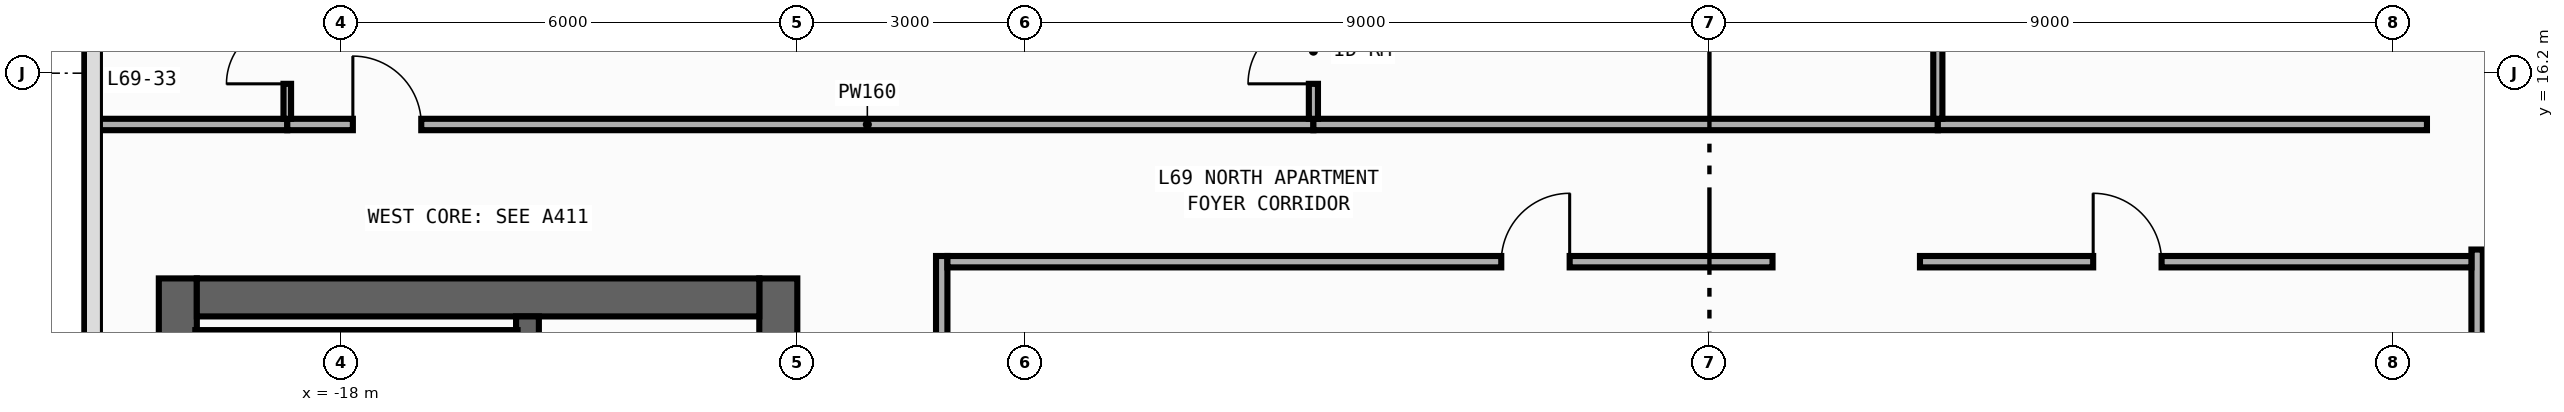
"""IFC4 building model, lengths in metres.
Left out: names, types, materials, properties, quantities, classifications, styles, units other than length and angle.
Written with IfcOpenShell. Run it as: python <this file> out.ifc"""

import sys

from ifc_helpers import new_model, si_unit, direction, frame, frame_2d, origin, place, context, subcontext, project, spatial, rectangle, extrude, element, fill, save


model = new_model("IFC4")
c1 = context("Model", 3, precision=1e-05, world=origin(), true_north=direction((0.0, 1.0)))
c2 = subcontext(c1, "Body", "Model", "MODEL_VIEW")
j1 = project(units=[si_unit("LENGTHUNIT", "METRE"), si_unit("PLANEANGLEUNIT", "RADIAN")], contexts=[c1])
p1 = place(None, origin())
s1 = spatial("IfcSite", under=j1, at=p1, CompositionType="ELEMENT")
p2 = place(p1, origin())
s2 = spatial("IfcBuilding", under=s1, at=p2, CompositionType="ELEMENT")
p3 = place(p2, frame((0.0, 0.0, 289.0)))
s3 = spatial("IfcBuildingStorey", under=s2, at=p3, CompositionType="ELEMENT", Elevation=289.0)
p4 = place(p3, frame((-20.15, -13.5, 0.0), z_axis=(0.0, 0.0, 1.0), x_axis=(0.0, 1.0, 0.0)))
e1 = element("IfcWall", 1, at=p4, inside=s3, PredefinedType="SHEAR", context=c2, shape_type="SweptSolid", body=[
    extrude(rectangle(XDim=27.0, YDim=0.5, at=frame_2d((13.5, 0.0))), origin(), (0.0, 0.0, 1.0), 3.54),
])
p5 = place(p3, frame((-12.25, -13.5, 0.0), z_axis=(0.0, 0.0, 1.0), x_axis=(0.0, 1.0, 0.0)))
e2 = element("IfcWall", 2, at=p5, inside=s3, PredefinedType="SHEAR", context=c2, shape_type="SweptSolid", body=[
    extrude(rectangle(XDim=27.0, YDim=0.5, at=frame_2d((13.5, 0.0))), origin(), (0.0, 0.0, 1.0), 3.54),
])
p6 = place(p5, frame((15.175, 0.0, 0.0)))
e3 = element("IfcOpeningElement", 3, at=p6, cuts=e2, PredefinedType="OPENING", context=c2, shape_type="SweptSolid", body=[
    extrude(rectangle(XDim=0.85, YDim=2.1, at=frame_2d((0.425, 1.05))), frame((0.0, 0.26, 0.0), z_axis=(0.0, -1.0, 0.0), x_axis=(1.0, 0.0, 0.0)), (0.0, 0.0, 1.0), 0.52),
])
p7 = place(p5, frame((21.275, 0.0, 0.0)))
e4 = element("IfcOpeningElement", 4, at=p7, cuts=e2, PredefinedType="OPENING", context=c2, shape_type="SweptSolid", body=[
    extrude(rectangle(XDim=0.85, YDim=2.1, at=frame_2d((0.425, 1.05))), frame((0.0, 0.26, 0.0), z_axis=(0.0, -1.0, 0.0), x_axis=(1.0, 0.0, 0.0)), (0.0, 0.0, 1.0), 0.52),
])
p8 = place(p5, frame((4.275, 0.0, 0.0)))
e5 = element("IfcOpeningElement", 5, at=p8, cuts=e2, PredefinedType="OPENING", context=c2, shape_type="SweptSolid", body=[
    extrude(rectangle(XDim=0.85, YDim=2.1, at=frame_2d((0.425, 1.05))), frame((0.0, 0.26, 0.0), z_axis=(0.0, -1.0, 0.0), x_axis=(1.0, 0.0, 0.0)), (0.0, 0.0, 1.0), 0.52),
])
p9 = place(p5, frame((10.275, 0.0, 0.0)))
e6 = element("IfcOpeningElement", 6, at=p9, cuts=e2, PredefinedType="OPENING", context=c2, shape_type="SweptSolid", body=[
    extrude(rectangle(XDim=0.85, YDim=2.1, at=frame_2d((0.425, 1.05))), frame((0.0, 0.26, 0.0), z_axis=(0.0, -1.0, 0.0), x_axis=(1.0, 0.0, 0.0)), (0.0, 0.0, 1.0), 0.52),
])
p10 = place(p5, frame((12.725, 0.0, 0.0)))
e7 = element("IfcOpeningElement", 7, at=p10, cuts=e2, PredefinedType="OPENING", context=c2, shape_type="SweptSolid", body=[
    extrude(rectangle(XDim=1.15, YDim=2.2, at=frame_2d((0.575, 1.1))), frame((0.0, 0.26, 0.0), z_axis=(0.0, -1.0, 0.0), x_axis=(1.0, 0.0, 0.0)), (0.0, 0.0, 1.0), 0.52),
])
p11 = place(p5, frame((1.625, 0.0, 0.0)))
e8 = element("IfcOpeningElement", 8, at=p11, cuts=e2, PredefinedType="OPENING", context=c2, shape_type="SweptSolid", body=[
    extrude(rectangle(XDim=0.85, YDim=2.1, at=frame_2d((0.425, 1.05))), frame((0.0, 0.26, 0.0), z_axis=(0.0, -1.0, 0.0), x_axis=(1.0, 0.0, 0.0)), (0.0, 0.0, 1.0), 0.52),
])
p12 = place(p3, frame((-19.9, 13.25, 0.0), z_axis=(0.0, 0.0, 1.0), x_axis=(1.0, 0.0, 0.0)))
e9 = element("IfcWall", 9, at=p12, inside=s3, PredefinedType="SHEAR", context=c2, shape_type="SweptSolid", body=[
    extrude(rectangle(XDim=7.4, YDim=0.5, at=frame_2d((3.7, 0.0))), origin(), (0.0, 0.0, 1.0), 3.54),
])
p13 = place(p3, frame((-15.55, -13.0, 0.0), z_axis=(0.0, 0.0, 1.0), x_axis=(0.0, 1.0, 0.0)))
e10 = element("IfcWall", 10, at=p13, inside=s3, PredefinedType="SHEAR", context=c2, shape_type="SweptSolid", body=[
    extrude(rectangle(XDim=26.0, YDim=0.3, at=frame_2d((13.0, 0.0))), origin(), (0.0, 0.0, 1.0), 3.54),
])
p14 = place(p13, frame((12.225, 0.0, 0.0)))
e11 = element("IfcOpeningElement", 11, at=p14, cuts=e10, PredefinedType="OPENING", context=c2, shape_type="SweptSolid", body=[
    extrude(rectangle(XDim=1.15, YDim=2.2, at=frame_2d((0.575, 1.1))), frame((0.0, 0.16, 0.0), z_axis=(0.0, -1.0, 0.0), x_axis=(1.0, 0.0, 0.0)), (0.0, 0.0, 1.0), 0.32),
])
p15 = place(p13, frame((1.125, 0.0, 0.0)))
e12 = element("IfcOpeningElement", 12, at=p15, cuts=e10, PredefinedType="OPENING", context=c2, shape_type="SweptSolid", body=[
    extrude(rectangle(XDim=0.85, YDim=2.1, at=frame_2d((0.425, 1.05))), frame((0.0, 0.16, 0.0), z_axis=(0.0, -1.0, 0.0), x_axis=(1.0, 0.0, 0.0)), (0.0, 0.0, 1.0), 0.32),
])
p16 = place(p3, frame((-19.92, 12.71, 0.0), z_axis=(0.0, 0.0, 1.0), x_axis=(1.0, 0.0, 0.0)))
e13 = element("IfcWall", 13, at=p16, inside=s3, PredefinedType="SHEAR", context=c2, shape_type="SweptSolid", body=[
    extrude(rectangle(XDim=4.24, YDim=0.22, at=frame_2d((2.12, 0.0))), origin(), (0.0, 0.0, 1.0), 3.54),
])
p17 = place(p3, frame((-10.1, 2.39, 0.0), z_axis=(0.0, 0.0, 1.0), x_axis=(0.0, 1.0, 0.0)))
e14 = element("IfcWall", 14, at=p17, inside=s3, PredefinedType="PARTITIONING", context=c2, shape_type="SweptSolid", body=[
    extrude(rectangle(XDim=11.405, YDim=0.15, at=frame_2d((5.703, 0.0))), origin(), (0.0, 0.0, 1.0), 3.54),
])
p18 = place(p17, frame((2.5, 0.0, 0.0)))
e15 = element("IfcOpeningElement", 15, at=p18, cuts=e14, PredefinedType="OPENING", context=c2, shape_type="SweptSolid", body=[
    extrude(rectangle(XDim=0.9, YDim=2.15, at=frame_2d((0.45, 1.075))), frame((0.0, 0.085, 0.0), z_axis=(0.0, -1.0, 0.0), x_axis=(1.0, 0.0, 0.0)), (0.0, 0.0, 1.0), 0.17),
])
p19 = place(p3, frame((10.1, 2.39, 0.0), z_axis=(0.0, 0.0, 1.0), x_axis=(0.0, 1.0, 0.0)))
e16 = element("IfcWall", 16, at=p19, inside=s3, PredefinedType="PARTITIONING", context=c2, shape_type="SweptSolid", body=[
    extrude(rectangle(XDim=11.49, YDim=0.15, at=frame_2d((5.745, 0.0))), origin(), (0.0, 0.0, 1.0), 3.54),
])
p20 = place(p19, frame((2.475, 0.0, 0.0)))
e17 = element("IfcOpeningElement", 17, at=p20, cuts=e16, PredefinedType="OPENING", context=c2, shape_type="SweptSolid", body=[
    extrude(rectangle(XDim=0.9, YDim=2.15, at=frame_2d((0.45, 1.075))), frame((0.0, 0.085, 0.0), z_axis=(0.0, -1.0, 0.0), x_axis=(1.0, 0.0, 0.0)), (0.0, 0.0, 1.0), 0.17),
])
p21 = place(p3, frame((-21.255, 15.525, 0.0), z_axis=(0.0, 0.0, 1.0), x_axis=(1.0, 0.0, 0.0)))
e18 = element("IfcWall", 18, at=p21, inside=s3, PredefinedType="PARTITIONING", context=c2, shape_type="SweptSolid", body=[
    extrude(rectangle(XDim=2.545, YDim=0.15, at=frame_2d((1.272, 0.0))), origin(), (0.0, 0.0, 1.0), 3.54),
])
p22 = place(p3, frame((-18.71, 15.525, 0.0), z_axis=(0.0, 0.0, 1.0), x_axis=(1.0, 0.0, 0.0)))
e19 = element("IfcWall", 19, at=p22, inside=s3, PredefinedType="PARTITIONING", context=c2, shape_type="SweptSolid", body=[
    extrude(rectangle(XDim=13.5, YDim=0.15, at=frame_2d((6.75, 0.0))), origin(), (0.0, 0.0, 1.0), 3.54),
])
p23 = place(p22, frame((0.863, 0.0, 0.0)))
e20 = element("IfcOpeningElement", 20, at=p23, cuts=e19, PredefinedType="OPENING", context=c2, shape_type="SweptSolid", body=[
    extrude(rectangle(XDim=0.9, YDim=2.15, at=frame_2d((0.45, 1.075))), frame((0.0, 0.085, 0.0), z_axis=(0.0, -1.0, 0.0), x_axis=(1.0, 0.0, 0.0)), (0.0, 0.0, 1.0), 0.17),
])
p24 = place(p3, frame((-5.21, 15.525, 0.0), z_axis=(0.0, 0.0, 1.0), x_axis=(1.0, 0.0, 0.0)))
e21 = element("IfcWall", 21, at=p24, inside=s3, PredefinedType="PARTITIONING", context=c2, shape_type="SweptSolid", body=[
    extrude(rectangle(XDim=8.215, YDim=0.15, at=frame_2d((4.107, 0.0))), origin(), (0.0, 0.0, 1.0), 3.54),
])
p25 = place(p3, frame((3.005, 15.525, 0.0), z_axis=(0.0, 0.0, 1.0), x_axis=(1.0, 0.0, 0.0)))
e22 = element("IfcWall", 22, at=p25, inside=s3, PredefinedType="PARTITIONING", context=c2, shape_type="SweptSolid", body=[
    extrude(rectangle(XDim=6.435, YDim=0.15, at=frame_2d((3.218, 0.0))), origin(), (0.0, 0.0, 1.0), 3.54),
])
p26 = place(p3, frame((-10.025, 13.72, 0.0), z_axis=(0.0, 0.0, 1.0), x_axis=(1.0, 0.0, 0.0)))
e23 = element("IfcWall", 23, at=p26, inside=s3, PredefinedType="PARTITIONING", context=c2, shape_type="SweptSolid", body=[
    extrude(rectangle(XDim=10.855, YDim=0.15, at=frame_2d((5.427, 0.0))), origin(), (0.0, 0.0, 1.0), 3.54),
])
p27 = place(p26, frame((7.286, 0.0, 0.0)))
e24 = element("IfcOpeningElement", 24, at=p27, cuts=e23, PredefinedType="OPENING", context=c2, shape_type="SweptSolid", body=[
    extrude(rectangle(XDim=0.9, YDim=2.15, at=frame_2d((0.45, 1.075))), frame((0.0, 0.085, 0.0), z_axis=(0.0, -1.0, 0.0), x_axis=(1.0, 0.0, 0.0)), (0.0, 0.0, 1.0), 0.17),
])
p28 = place(p3, frame((2.77, 13.72, 0.0), z_axis=(0.0, 0.0, 1.0), x_axis=(1.0, 0.0, 0.0)))
e25 = element("IfcWall", 25, at=p28, inside=s3, PredefinedType="PARTITIONING", context=c2, shape_type="SweptSolid", body=[
    extrude(rectangle(XDim=7.255, YDim=0.15, at=frame_2d((3.627, 0.0))), origin(), (0.0, 0.0, 1.0), 3.54),
])
p29 = place(p28, frame((2.279, 0.0, 0.0)))
e26 = element("IfcOpeningElement", 26, at=p29, cuts=e25, PredefinedType="OPENING", context=c2, shape_type="SweptSolid", body=[
    extrude(rectangle(XDim=0.9, YDim=2.15, at=frame_2d((0.45, 1.075))), frame((0.0, 0.085, 0.0), z_axis=(0.0, -1.0, 0.0), x_axis=(1.0, 0.0, 0.0)), (0.0, 0.0, 1.0), 0.17),
])
p30 = place(p3, frame((-18.71, 15.6, 0.0), z_axis=(0.0, 0.0, 1.0), x_axis=(0.0, 1.0, 0.0)))
e27 = element("IfcWall", 27, at=p30, inside=s3, PredefinedType="PARTITIONING", context=c2, shape_type="SweptSolid", body=[
    extrude(rectangle(XDim=2.5, YDim=0.1, at=frame_2d((1.25, 0.0))), origin(), (0.0, 0.0, 1.0), 3.54),
])
p31 = place(p30, frame((0.46, 0.0, 0.0)))
e28 = element("IfcOpeningElement", 28, at=p31, cuts=e27, PredefinedType="OPENING", context=c2, shape_type="SweptSolid", body=[
    extrude(rectangle(XDim=0.8, YDim=2.1, at=frame_2d((0.4, 1.05))), frame((0.0, 0.06, 0.0), z_axis=(0.0, -1.0, 0.0), x_axis=(1.0, 0.0, 0.0)), (0.0, 0.0, 1.0), 0.12),
])
p32 = place(p3, frame((-5.21, 15.6, 0.0), z_axis=(0.0, 0.0, 1.0), x_axis=(0.0, 1.0, 0.0)))
e29 = element("IfcWall", 29, at=p32, inside=s3, PredefinedType="PARTITIONING", context=c2, shape_type="SweptSolid", body=[
    extrude(rectangle(XDim=4.5, YDim=0.12, at=frame_2d((2.25, 0.0))), origin(), (0.0, 0.0, 1.0), 3.54),
])
p33 = place(p32, frame((0.46, 0.0, 0.0)))
e30 = element("IfcOpeningElement", 30, at=p33, cuts=e29, PredefinedType="OPENING", context=c2, shape_type="SweptSolid", body=[
    extrude(rectangle(XDim=0.86, YDim=2.15, at=frame_2d((0.43, 1.075))), frame((0.0, 0.07, 0.0), z_axis=(0.0, -1.0, 0.0), x_axis=(1.0, 0.0, 0.0)), (0.0, 0.0, 1.0), 0.14),
])
p34 = place(p3, frame((3.005, 15.6, 0.0), z_axis=(0.0, 0.0, 1.0), x_axis=(0.0, 1.0, 0.0)))
e31 = element("IfcWall", 31, at=p34, inside=s3, PredefinedType="PARTITIONING", context=c2, shape_type="SweptSolid", body=[
    extrude(rectangle(XDim=8.455, YDim=0.12, at=frame_2d((4.228, 0.0))), origin(), (0.0, 0.0, 1.0), 3.54),
])
p35 = place(p34, frame((7.195, 0.0, 0.0)))
e32 = element("IfcOpeningElement", 32, at=p35, cuts=e31, PredefinedType="OPENING", context=c2, shape_type="SweptSolid", body=[
    extrude(rectangle(XDim=0.8, YDim=2.1, at=frame_2d((0.4, 1.05))), frame((0.0, 0.07, 0.0), z_axis=(0.0, -1.0, 0.0), x_axis=(1.0, 0.0, 0.0)), (0.0, 0.0, 1.0), 0.14),
])
p36 = place(p23, origin())
e33 = element("IfcDoor", 33, at=p36, inside=s3, OperationType="SINGLE_SWING_LEFT", PredefinedType="DOOR", context=c2, shape_type="SweptSolid", body=[
    extrude(rectangle(XDim=0.9, YDim=2.15, at=frame_2d((0.45, 1.075))), frame((0.0, 0.025, 0.0), z_axis=(0.0, -1.0, 0.0), x_axis=(1.0, 0.0, 0.0)), (0.0, 0.0, 1.0), 0.05),
])
fill(e20, e33)
p37 = place(p27, origin())
e34 = element("IfcDoor", 34, at=p37, inside=s3, OperationType="SINGLE_SWING_RIGHT", PredefinedType="DOOR", context=c2, shape_type="SweptSolid", body=[
    extrude(rectangle(XDim=0.9, YDim=2.15, at=frame_2d((0.45, 1.075))), frame((0.0, 0.025, 0.0), z_axis=(0.0, -1.0, 0.0), x_axis=(1.0, 0.0, 0.0)), (0.0, 0.0, 1.0), 0.05),
])
fill(e24, e34)
p38 = place(p29, origin())
e35 = element("IfcDoor", 35, at=p38, inside=s3, OperationType="SINGLE_SWING_LEFT", PredefinedType="DOOR", context=c2, shape_type="SweptSolid", body=[
    extrude(rectangle(XDim=0.9, YDim=2.15, at=frame_2d((0.45, 1.075))), frame((0.0, 0.025, 0.0), z_axis=(0.0, -1.0, 0.0), x_axis=(1.0, 0.0, 0.0)), (0.0, 0.0, 1.0), 0.05),
])
fill(e26, e35)
p39 = place(p31, origin())
e36 = element("IfcDoor", 36, at=p39, inside=s3, OperationType="SINGLE_SWING_LEFT", PredefinedType="DOOR", context=c2, shape_type="SweptSolid", body=[
    extrude(rectangle(XDim=0.8, YDim=2.1, at=frame_2d((0.4, 1.05))), frame((0.0, 0.025, 0.0), z_axis=(0.0, -1.0, 0.0), x_axis=(1.0, 0.0, 0.0)), (0.0, 0.0, 1.0), 0.05),
])
fill(e28, e36)
p40 = place(p33, origin())
e37 = element("IfcDoor", 37, at=p40, inside=s3, OperationType="SINGLE_SWING_LEFT", PredefinedType="DOOR", context=c2, shape_type="SweptSolid", body=[
    extrude(rectangle(XDim=0.86, YDim=2.15, at=frame_2d((0.43, 1.075))), frame((0.0, 0.025, 0.0), z_axis=(0.0, -1.0, 0.0), x_axis=(1.0, 0.0, 0.0)), (0.0, 0.0, 1.0), 0.05),
])
fill(e30, e37)
save(model, sys.argv[1])
